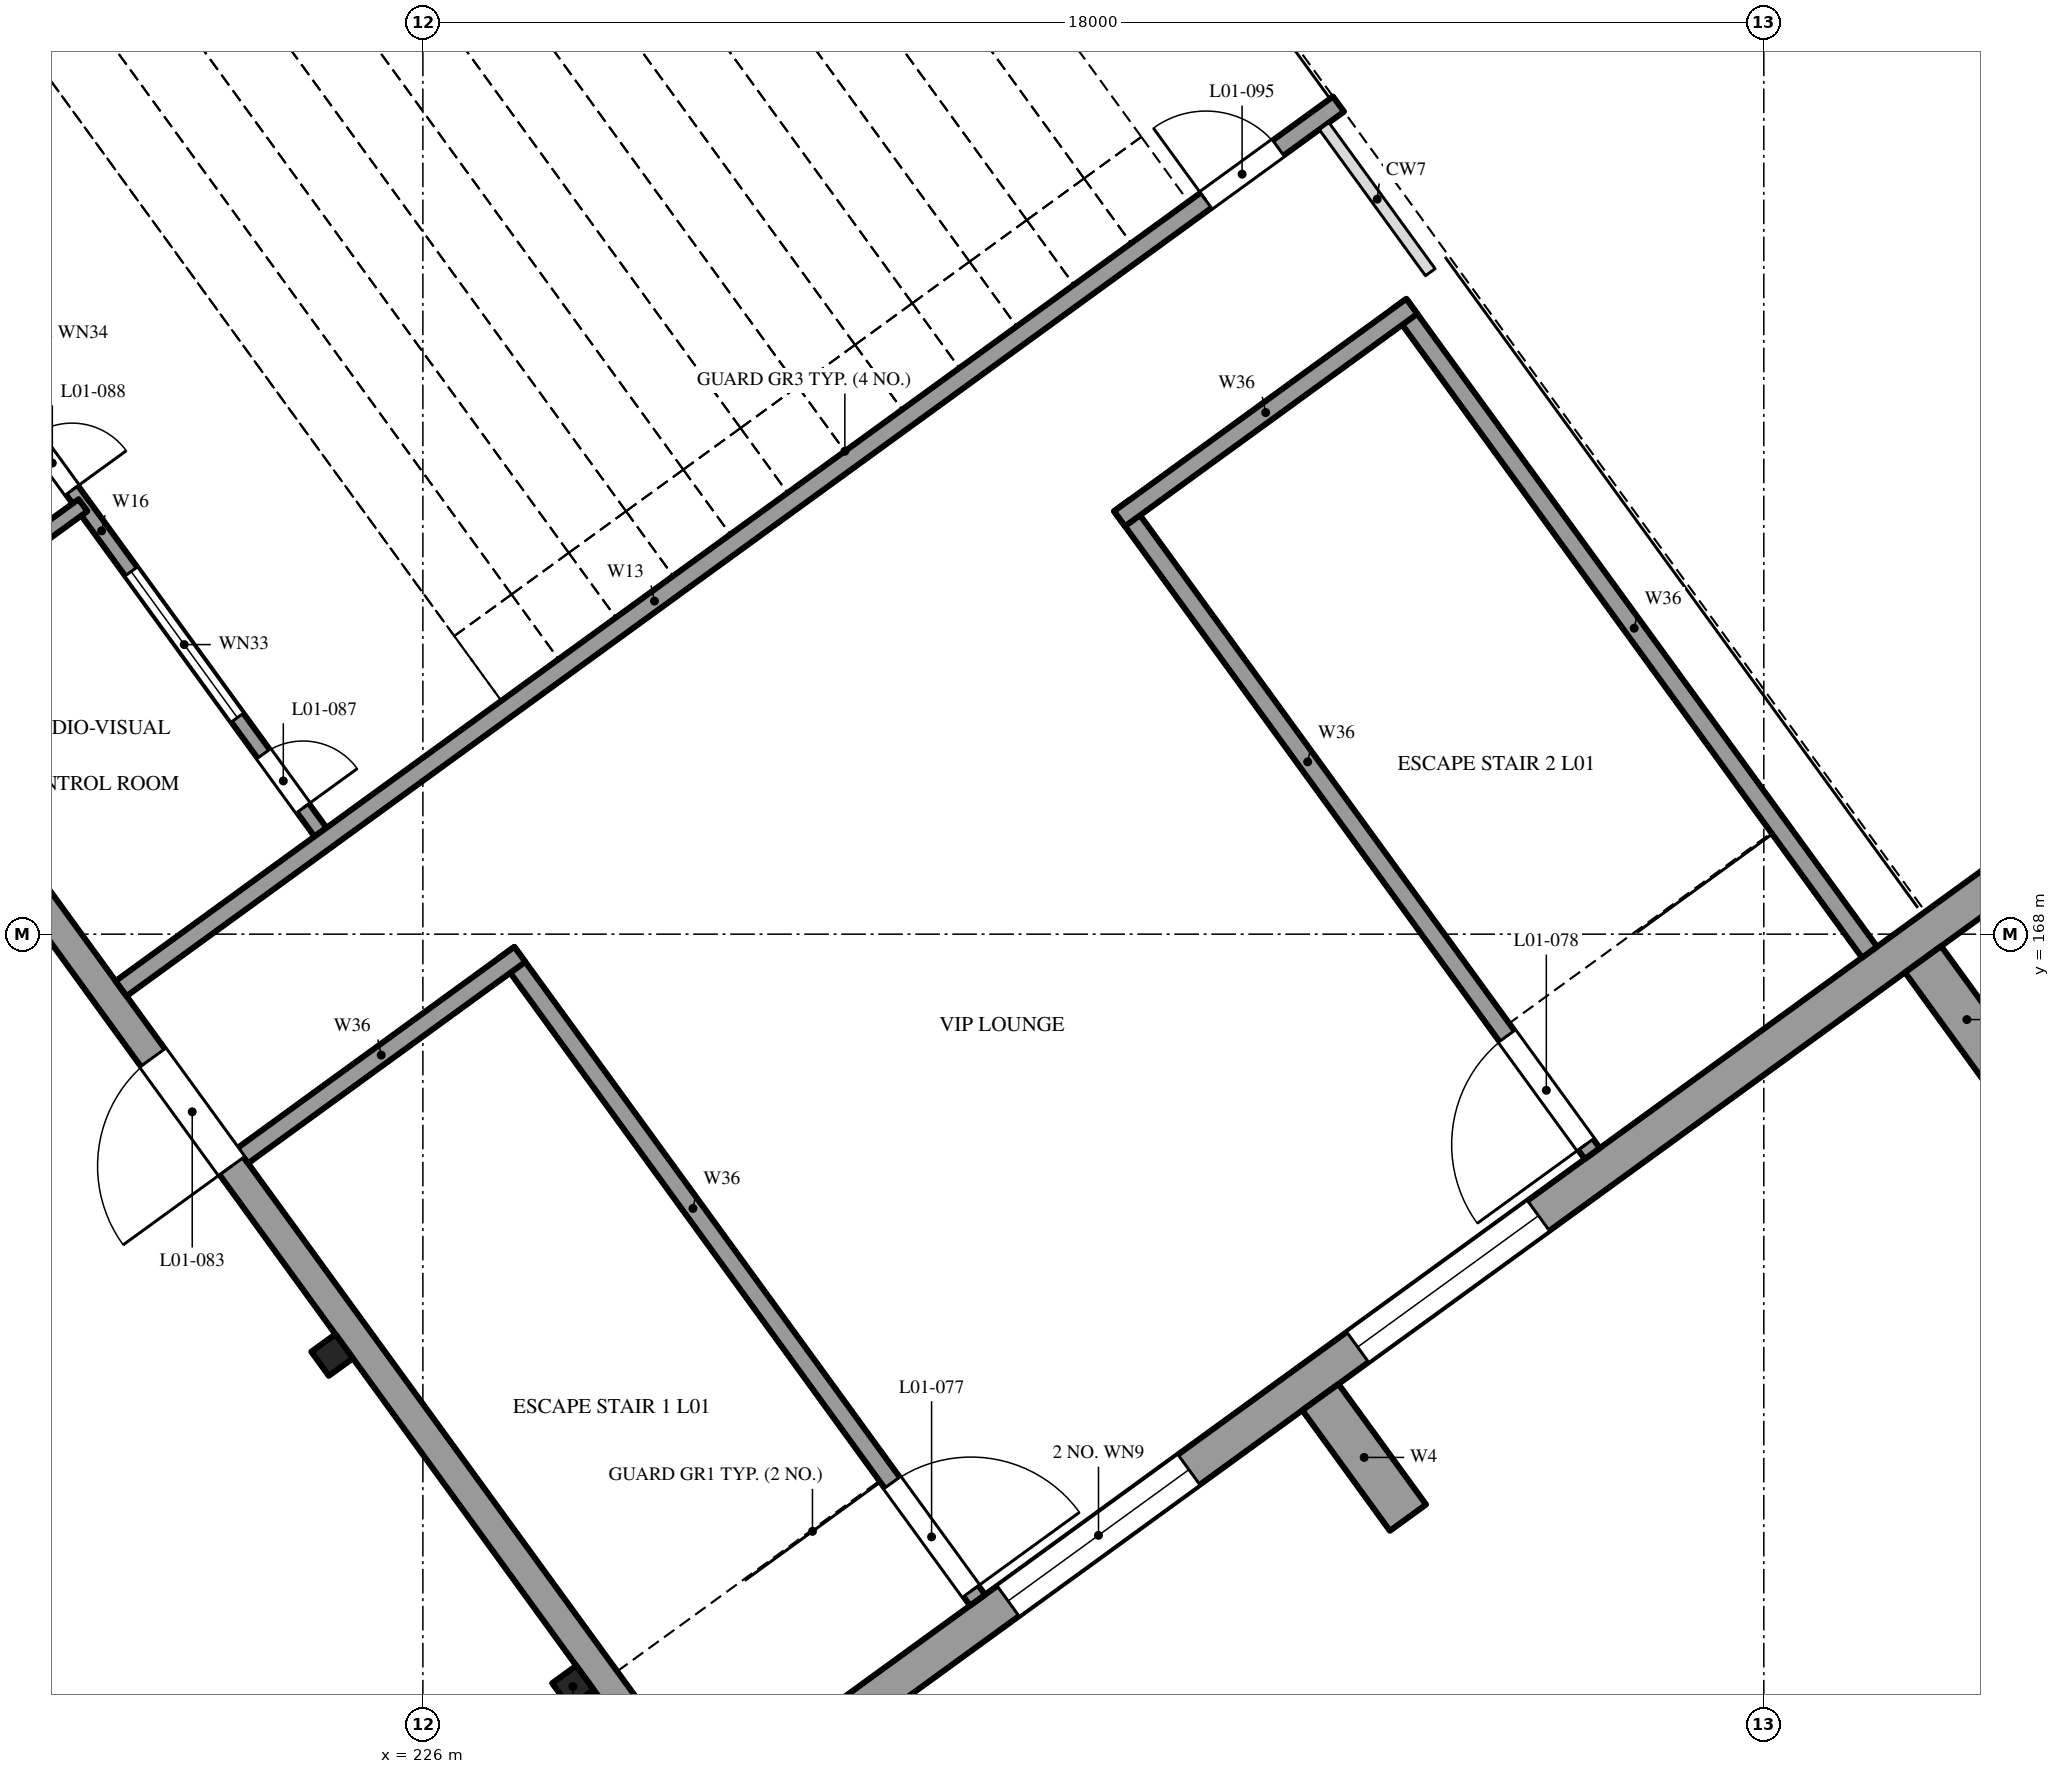
"""IFC4 building model, lengths in metres.
Left out: names, types, materials, properties, quantities, classifications, styles, units other than length and angle.
Written with IfcOpenShell. Run it as: python <this file> out.ifc"""

import sys

from ifc_helpers import new_model, si_unit, direction, frame, frame_2d, origin, origin_2d, place, context, subcontext, project, spatial, rectangle, extrude, element, fill, save


model = new_model("IFC4")
c1 = context("Model", 3, precision=1e-05, world=origin(), true_north=direction((0.0, 1.0)))
c2 = subcontext(c1, "Body", "Model", "MODEL_VIEW")
j1 = project(units=[si_unit("LENGTHUNIT", "METRE"), si_unit("PLANEANGLEUNIT", "RADIAN")], contexts=[c1])
p1 = place(None, origin())
s1 = spatial("IfcSite", under=j1, at=p1, CompositionType="ELEMENT")
p2 = place(p1, origin())
s2 = spatial("IfcBuilding", under=s1, at=p2, CompositionType="ELEMENT")
p3 = place(p2, frame((0.0, 0.0, 7.2)))
s3 = spatial("IfcBuildingStorey", under=s2, at=p3, CompositionType="ELEMENT", Elevation=7.2)
p4 = place(p3, frame((229.649, 155.991, 0.0), z_axis=(0.0, 0.0, 1.0), x_axis=(0.809016008294, 0.587786609514, 0.0)))
e1 = element("IfcWall", 1, at=p4, inside=s3, PredefinedType="SOLIDWALL", context=c2, shape_type="SweptSolid", body=[
    extrude(rectangle(XDim=60.4, YDim=0.5, at=frame_2d((30.2, 0.0))), origin(), (0.0, 0.0, 1.0), 4.8),
])
p5 = place(p4, frame((5.2, 0.0, 1.0)))
e2 = element("IfcOpeningElement", 2, at=p5, cuts=e1, PredefinedType="OPENING", context=c2, shape_type="SweptSolid", body=[
    extrude(rectangle(XDim=3.0, YDim=2.0, at=frame_2d((1.5, 1.0))), frame((0.0, 0.26, 0.0), z_axis=(0.0, -1.0, 0.0), x_axis=(1.0, 0.0, 0.0)), (0.0, 0.0, 1.0), 0.52),
])
p6 = place(p4, frame((11.0, 0.0, 1.0)))
e3 = element("IfcOpeningElement", 3, at=p6, cuts=e1, PredefinedType="OPENING", context=c2, shape_type="SweptSolid", body=[
    extrude(rectangle(XDim=3.0, YDim=2.0, at=frame_2d((1.5, 1.0))), frame((0.0, 0.26, 0.0), z_axis=(0.0, -1.0, 0.0), x_axis=(1.0, 0.0, 0.0)), (0.0, 0.0, 1.0), 0.52),
])
p7 = place(p3, frame((229.664, 156.311, 0.0), z_axis=(0.0, 0.0, 1.0), x_axis=(-0.587784977279, 0.809017194184, 0.0)))
e4 = element("IfcWall", 4, at=p7, inside=s3, PredefinedType="SOLIDWALL", context=c2, shape_type="SweptSolid", body=[
    extrude(rectangle(XDim=53.5, YDim=0.4, at=frame_2d((26.75, 0.0))), origin(), (0.0, 0.0, 1.0), 4.8),
])
p8 = place(p7, frame((10.6, 0.0, 0.0)))
e5 = element("IfcOpeningElement", 5, at=p8, cuts=e4, PredefinedType="OPENING", context=c2, shape_type="SweptSolid", body=[
    extrude(rectangle(XDim=1.8, YDim=2.1, at=frame_2d((0.9, 1.05))), frame((0.0, 0.21, 0.0), z_axis=(0.0, -1.0, 0.0), x_axis=(1.0, 0.0, 0.0)), (0.0, 0.0, 1.0), 0.42),
])
for number, where, z_axis, x_axis in (
    (6, (238.048, 161.784, 0.0), (0.0, 0.0, 1.0), (0.588, -0.809, 0.0)),
    (7, (246.138, 167.662, 0.0), (0.0, 0.0, 1.0), (0.588, -0.809, 0.0)),
):
    element("IfcWall", number, at=place(p3, frame(where, z_axis=z_axis, x_axis=x_axis)), inside=s3, PredefinedType="SOLIDWALL", context=c2, shape_type="SweptSolid", body=[
        extrude(rectangle(XDim=2.0, YDim=0.6, at=frame_2d((1.0, 0.0))), origin(), (0.0, 0.0, 1.0), 4.8),
    ])
p9 = place(p3, frame((228.015, 157.9, 0.0), z_axis=(0.0, 0.0, 1.0), x_axis=(0.809016994375, 0.587785252292, 0.0)))
e8 = element("IfcColumn", 8, at=p9, inside=s3, PredefinedType="COLUMN", context=c2, shape_type="SweptSolid", body=[
    extrude(rectangle(XDim=0.4, YDim=0.4, at=origin_2d()), origin(), (0.0, 0.0, 1.0), 6.492),
])
p10 = place(p3, frame((224.782, 162.35, 0.0), z_axis=(0.0, 0.0, 1.0), x_axis=(0.809016994375, 0.587785252292, 0.0)))
e9 = element("IfcColumn", 9, at=p10, inside=s3, PredefinedType="COLUMN", context=c2, shape_type="SweptSolid", body=[
    extrude(rectangle(XDim=0.4, YDim=0.4, at=origin_2d()), origin(), (0.0, 0.0, 1.0), 6.323),
])
p11 = place(p3, frame((233.446, 159.059, 0.0), z_axis=(0.0, 0.0, 1.0), x_axis=(-0.587801633775, 0.809005092278, 0.0)))
e10 = element("IfcWall", 10, at=p11, inside=s3, PredefinedType="SOLIDWALL", context=c2, shape_type="SweptSolid", body=[
    extrude(rectangle(XDim=10.75, YDim=0.25, at=frame_2d((5.375, 0.0))), origin(), (0.0, 0.0, 1.0), 4.55),
])
p12 = place(p11, frame((0.15, 0.0, 0.0)))
e11 = element("IfcOpeningElement", 11, at=p12, cuts=e10, PredefinedType="OPENING", context=c2, shape_type="SweptSolid", body=[
    extrude(rectangle(XDim=1.8, YDim=2.1, at=frame_2d((0.9, 1.05))), frame((0.0, 0.135, 0.0), z_axis=(0.0, -1.0, 0.0), x_axis=(1.0, 0.0, 0.0)), (0.0, 0.0, 1.0), 0.27),
])
p13 = place(p3, frame((223.58, 165.024, 0.0), z_axis=(0.0, 0.0, 1.0), x_axis=(0.809009113768, 0.587796098864, 0.0)))
e12 = element("IfcWall", 12, at=p13, inside=s3, PredefinedType="SOLIDWALL", context=c2, shape_type="SweptSolid", body=[
    extrude(rectangle(XDim=4.6, YDim=0.25, at=frame_2d((2.3, 0.0))), origin(), (0.0, 0.0, 1.0), 4.55),
])
p14 = place(p3, frame((241.698, 165.054, 0.0), z_axis=(0.0, 0.0, 1.0), x_axis=(-0.587790834139, 0.809012938897, 0.0)))
e13 = element("IfcWall", 13, at=p14, inside=s3, PredefinedType="SOLIDWALL", context=c2, shape_type="SweptSolid", body=[
    extrude(rectangle(XDim=10.75, YDim=0.25, at=frame_2d((5.375, 0.0))), origin(), (0.0, 0.0, 1.0), 4.55),
])
p15 = place(p14, frame((0.15, 0.0, 0.0)))
e14 = element("IfcOpeningElement", 14, at=p15, cuts=e13, PredefinedType="OPENING", context=c2, shape_type="SweptSolid", body=[
    extrude(rectangle(XDim=1.8, YDim=2.1, at=frame_2d((0.9, 1.05))), frame((0.0, 0.135, 0.0), z_axis=(0.0, -1.0, 0.0), x_axis=(1.0, 0.0, 0.0)), (0.0, 0.0, 1.0), 0.27),
])
p16 = place(p3, frame((245.419, 167.758, 0.0), z_axis=(0.0, 0.0, 1.0), x_axis=(-0.587801633775, 0.809005092278, 0.0)))
e15 = element("IfcWall", 15, at=p16, inside=s3, PredefinedType="SOLIDWALL", context=c2, shape_type="SweptSolid", body=[
    extrude(rectangle(XDim=10.75, YDim=0.25, at=frame_2d((5.375, 0.0))), origin(), (0.0, 0.0, 1.0), 4.55),
])
p17 = place(p3, frame((235.351, 173.577, 0.0), z_axis=(0.0, 0.0, 1.0), x_axis=(0.809016791155, 0.587785532001, 0.0)))
e16 = element("IfcWall", 16, at=p17, inside=s3, PredefinedType="SOLIDWALL", context=c2, shape_type="SweptSolid", body=[
    extrude(rectangle(XDim=4.85, YDim=0.25, at=frame_2d((2.425, 0.0))), origin(), (0.0, 0.0, 1.0), 4.55),
])
p18 = place(p3, frame((224.626, 169.369, 1.8), z_axis=(0.0, 0.0, 1.0), x_axis=(-0.587785255346, 0.809016992157, 0.0)))
e17 = element("IfcWall", 17, at=p18, inside=s3, PredefinedType="SOLIDWALL", context=c2, shape_type="SweptSolid", body=[
    extrude(rectangle(XDim=26.45, YDim=0.2, at=frame_2d((13.225, 0.0))), origin(), (0.0, 0.0, 1.0), 2.75),
])
p19 = place(p18, frame((0.4, 0.0, 0.0)))
e18 = element("IfcOpeningElement", 18, at=p19, cuts=e17, PredefinedType="OPENING", context=c2, shape_type="SweptSolid", body=[
    extrude(rectangle(XDim=0.9, YDim=2.1, at=frame_2d((0.45, 1.05))), frame((0.0, 0.11, 0.0), z_axis=(0.0, -1.0, 0.0), x_axis=(1.0, 0.0, 0.0)), (0.0, 0.0, 1.0), 0.22),
])
p20 = place(p18, frame((1.9, 0.0, 1.0)))
e19 = element("IfcOpeningElement", 19, at=p20, cuts=e17, PredefinedType="OPENING", context=c2, shape_type="SweptSolid", body=[
    extrude(rectangle(XDim=2.425, YDim=1.0, at=frame_2d((1.212, 0.5))), frame((0.0, 0.11, 0.0), z_axis=(0.0, -1.0, 0.0), x_axis=(1.0, 0.0, 0.0)), (0.0, 0.0, 1.0), 0.22),
])
p21 = place(p18, frame((5.675, 0.0, 0.0)))
e20 = element("IfcOpeningElement", 20, at=p21, cuts=e17, PredefinedType="OPENING", context=c2, shape_type="SweptSolid", body=[
    extrude(rectangle(XDim=0.9, YDim=2.1, at=frame_2d((0.45, 1.05))), frame((0.0, 0.11, 0.0), z_axis=(0.0, -1.0, 0.0), x_axis=(1.0, 0.0, 0.0)), (0.0, 0.0, 1.0), 0.22),
])
p22 = place(p18, frame((6.875, 0.0, 1.0)))
e21 = element("IfcOpeningElement", 21, at=p22, cuts=e17, PredefinedType="OPENING", context=c2, shape_type="SweptSolid", body=[
    extrude(rectangle(XDim=0.9, YDim=1.0, at=frame_2d((0.45, 0.5))), frame((0.0, 0.11, 0.0), z_axis=(0.0, -1.0, 0.0), x_axis=(1.0, 0.0, 0.0)), (0.0, 0.0, 1.0), 0.22),
])
p23 = place(p18, frame((8.275, 0.0, 0.0)))
e22 = element("IfcOpeningElement", 22, at=p23, cuts=e17, PredefinedType="OPENING", context=c2, shape_type="SweptSolid", body=[
    extrude(rectangle(XDim=0.9, YDim=2.1, at=frame_2d((0.45, 1.05))), frame((0.0, 0.11, 0.0), z_axis=(0.0, -1.0, 0.0), x_axis=(1.0, 0.0, 0.0)), (0.0, 0.0, 1.0), 0.22),
])
p24 = place(p18, frame((9.475, 0.0, 1.0)))
e23 = element("IfcOpeningElement", 23, at=p24, cuts=e17, PredefinedType="OPENING", context=c2, shape_type="SweptSolid", body=[
    extrude(rectangle(XDim=0.9, YDim=1.0, at=frame_2d((0.45, 0.5))), frame((0.0, 0.11, 0.0), z_axis=(0.0, -1.0, 0.0), x_axis=(1.0, 0.0, 0.0)), (0.0, 0.0, 1.0), 0.22),
])
p25 = place(p18, frame((10.875, 0.0, 0.0)))
e24 = element("IfcOpeningElement", 24, at=p25, cuts=e17, PredefinedType="OPENING", context=c2, shape_type="SweptSolid", body=[
    extrude(rectangle(XDim=0.9, YDim=2.1, at=frame_2d((0.45, 1.05))), frame((0.0, 0.11, 0.0), z_axis=(0.0, -1.0, 0.0), x_axis=(1.0, 0.0, 0.0)), (0.0, 0.0, 1.0), 0.22),
])
p26 = place(p18, frame((12.075, 0.0, 1.0)))
e25 = element("IfcOpeningElement", 25, at=p26, cuts=e17, PredefinedType="OPENING", context=c2, shape_type="SweptSolid", body=[
    extrude(rectangle(XDim=0.9, YDim=1.0, at=frame_2d((0.45, 0.5))), frame((0.0, 0.11, 0.0), z_axis=(0.0, -1.0, 0.0), x_axis=(1.0, 0.0, 0.0)), (0.0, 0.0, 1.0), 0.22),
])
p27 = place(p18, frame((13.475, 0.0, 0.0)))
e26 = element("IfcOpeningElement", 26, at=p27, cuts=e17, PredefinedType="OPENING", context=c2, shape_type="SweptSolid", body=[
    extrude(rectangle(XDim=0.9, YDim=2.1, at=frame_2d((0.45, 1.05))), frame((0.0, 0.11, 0.0), z_axis=(0.0, -1.0, 0.0), x_axis=(1.0, 0.0, 0.0)), (0.0, 0.0, 1.0), 0.22),
])
p28 = place(p18, frame((14.675, 0.0, 1.0)))
e27 = element("IfcOpeningElement", 27, at=p28, cuts=e17, PredefinedType="OPENING", context=c2, shape_type="SweptSolid", body=[
    extrude(rectangle(XDim=0.9, YDim=1.0, at=frame_2d((0.45, 0.5))), frame((0.0, 0.11, 0.0), z_axis=(0.0, -1.0, 0.0), x_axis=(1.0, 0.0, 0.0)), (0.0, 0.0, 1.0), 0.22),
])
p29 = place(p18, frame((16.075, 0.0, 0.0)))
e28 = element("IfcOpeningElement", 28, at=p29, cuts=e17, PredefinedType="OPENING", context=c2, shape_type="SweptSolid", body=[
    extrude(rectangle(XDim=0.9, YDim=2.1, at=frame_2d((0.45, 1.05))), frame((0.0, 0.11, 0.0), z_axis=(0.0, -1.0, 0.0), x_axis=(1.0, 0.0, 0.0)), (0.0, 0.0, 1.0), 0.22),
])
p30 = place(p18, frame((17.275, 0.0, 1.0)))
e29 = element("IfcOpeningElement", 29, at=p30, cuts=e17, PredefinedType="OPENING", context=c2, shape_type="SweptSolid", body=[
    extrude(rectangle(XDim=0.9, YDim=1.0, at=frame_2d((0.45, 0.5))), frame((0.0, 0.11, 0.0), z_axis=(0.0, -1.0, 0.0), x_axis=(1.0, 0.0, 0.0)), (0.0, 0.0, 1.0), 0.22),
])
p31 = place(p18, frame((18.675, 0.0, 0.0)))
e30 = element("IfcOpeningElement", 30, at=p31, cuts=e17, PredefinedType="OPENING", context=c2, shape_type="SweptSolid", body=[
    extrude(rectangle(XDim=0.9, YDim=2.1, at=frame_2d((0.45, 1.05))), frame((0.0, 0.11, 0.0), z_axis=(0.0, -1.0, 0.0), x_axis=(1.0, 0.0, 0.0)), (0.0, 0.0, 1.0), 0.22),
])
p32 = place(p18, frame((19.875, 0.0, 1.0)))
e31 = element("IfcOpeningElement", 31, at=p32, cuts=e17, PredefinedType="OPENING", context=c2, shape_type="SweptSolid", body=[
    extrude(rectangle(XDim=0.9, YDim=1.0, at=frame_2d((0.45, 0.5))), frame((0.0, 0.11, 0.0), z_axis=(0.0, -1.0, 0.0), x_axis=(1.0, 0.0, 0.0)), (0.0, 0.0, 1.0), 0.22),
])
p33 = place(p18, frame((21.425, 0.0, 0.0)))
e32 = element("IfcOpeningElement", 32, at=p33, cuts=e17, PredefinedType="OPENING", context=c2, shape_type="SweptSolid", body=[
    extrude(rectangle(XDim=0.9, YDim=2.1, at=frame_2d((0.45, 1.05))), frame((0.0, 0.11, 0.0), z_axis=(0.0, -1.0, 0.0), x_axis=(1.0, 0.0, 0.0)), (0.0, 0.0, 1.0), 0.22),
])
p34 = place(p18, frame((22.925, 0.0, 1.0)))
e33 = element("IfcOpeningElement", 33, at=p34, cuts=e17, PredefinedType="OPENING", context=c2, shape_type="SweptSolid", body=[
    extrude(rectangle(XDim=2.425, YDim=1.0, at=frame_2d((1.212, 0.5))), frame((0.0, 0.11, 0.0), z_axis=(0.0, -1.0, 0.0), x_axis=(1.0, 0.0, 0.0)), (0.0, 0.0, 1.0), 0.22),
])
p35 = place(p3, frame((218.687, 171.76, 1.8), z_axis=(0.0, 0.0, 1.0), x_axis=(0.80901544635, 0.587787382961, 0.0)))
e34 = element("IfcWall", 34, at=p35, inside=s3, PredefinedType="SOLIDWALL", context=c2, shape_type="SweptSolid", body=[
    extrude(rectangle(XDim=3.4, YDim=0.2, at=frame_2d((1.7, 0.0))), origin(), (0.0, 0.0, 1.0), 2.75),
])
p36 = place(p3, frame((221.949, 167.27, 0.0), z_axis=(0.0, 0.0, 1.0), x_axis=(0.809018740047, 0.587782849573, 0.0)))
e35 = element("IfcWall", 35, at=p36, inside=s3, PredefinedType="SOLIDWALL", context=c2, shape_type="SweptSolid", body=[
    extrude(rectangle(XDim=20.2, YDim=0.25, at=frame_2d((10.1, 0.0))), origin(), (0.0, 0.0, 1.0), 4.55),
])
p37 = place(p36, frame((18.0, 0.0, 0.0)))
e36 = element("IfcOpeningElement", 36, at=p37, cuts=e35, PredefinedType="OPENING", context=c2, shape_type="SweptSolid", body=[
    extrude(rectangle(XDim=1.2, YDim=2.1, at=frame_2d((0.6, 1.05))), frame((0.0, 0.135, 0.0), z_axis=(0.0, -1.0, 0.0), x_axis=(1.0, 0.0, 0.0)), (0.0, 0.0, 1.0), 0.27),
])
p38 = place(p5, origin())
e37 = element("IfcWindow", 37, at=p38, inside=s3, PartitioningType="SINGLE_PANEL", PredefinedType="WINDOW", context=c2, shape_type="SweptSolid", body=[
    extrude(rectangle(XDim=3.0, YDim=2.0, at=frame_2d((1.5, 1.0))), frame((0.0, 0.03, 0.0), z_axis=(0.0, -1.0, 0.0), x_axis=(1.0, 0.0, 0.0)), (0.0, 0.0, 1.0), 0.06),
])
fill(e2, e37)
p39 = place(p6, origin())
e38 = element("IfcWindow", 38, at=p39, inside=s3, PartitioningType="SINGLE_PANEL", PredefinedType="WINDOW", context=c2, shape_type="SweptSolid", body=[
    extrude(rectangle(XDim=3.0, YDim=2.0, at=frame_2d((1.5, 1.0))), frame((0.0, 0.03, 0.0), z_axis=(0.0, -1.0, 0.0), x_axis=(1.0, 0.0, 0.0)), (0.0, 0.0, 1.0), 0.06),
])
fill(e3, e38)
p40 = place(p12, frame((1.8, 0.0, 0.0), z_axis=(0.0, 0.0, 1.0), x_axis=(-1.0, 0.0, 0.0)))
e39 = element("IfcDoor", 39, at=p40, inside=s3, OperationType="DOUBLE_DOOR_SINGLE_SWING", PredefinedType="DOOR", context=c2, shape_type="SweptSolid", body=[
    extrude(rectangle(XDim=1.8, YDim=2.1, at=frame_2d((0.9, 1.05))), frame((0.0, 0.025, 0.0), z_axis=(0.0, -1.0, 0.0), x_axis=(1.0, 0.0, 0.0)), (0.0, 0.0, 1.0), 0.05),
])
fill(e11, e39)
p41 = place(p15, origin())
e40 = element("IfcDoor", 40, at=p41, inside=s3, OperationType="DOUBLE_DOOR_SINGLE_SWING", PredefinedType="DOOR", context=c2, shape_type="SweptSolid", body=[
    extrude(rectangle(XDim=1.8, YDim=2.1, at=frame_2d((0.9, 1.05))), frame((0.0, 0.025, 0.0), z_axis=(0.0, -1.0, 0.0), x_axis=(1.0, 0.0, 0.0)), (0.0, 0.0, 1.0), 0.05),
])
fill(e14, e40)
p42 = place(p8, origin())
e41 = element("IfcDoor", 41, at=p42, inside=s3, OperationType="DOUBLE_DOOR_SINGLE_SWING", PredefinedType="DOOR", context=c2, shape_type="SweptSolid", body=[
    extrude(rectangle(XDim=1.8, YDim=2.1, at=frame_2d((0.9, 1.05))), frame((0.0, 0.025, 0.0), z_axis=(0.0, -1.0, 0.0), x_axis=(1.0, 0.0, 0.0)), (0.0, 0.0, 1.0), 0.05),
])
fill(e5, e41)
p43 = place(p19, frame((0.9, 0.0, 0.0), z_axis=(0.0, 0.0, 1.0), x_axis=(-1.0, 0.0, 0.0)))
e42 = element("IfcDoor", 42, at=p43, inside=s3, OperationType="SINGLE_SWING_RIGHT", PredefinedType="DOOR", context=c2, shape_type="SweptSolid", body=[
    extrude(rectangle(XDim=0.9, YDim=2.1, at=frame_2d((0.45, 1.05))), frame((0.0, 0.025, 0.0), z_axis=(0.0, -1.0, 0.0), x_axis=(1.0, 0.0, 0.0)), (0.0, 0.0, 1.0), 0.05),
])
fill(e18, e42)
p44 = place(p20, origin())
e43 = element("IfcWindow", 43, at=p44, inside=s3, PartitioningType="SINGLE_PANEL", PredefinedType="WINDOW", context=c2, shape_type="SweptSolid", body=[
    extrude(rectangle(XDim=2.425, YDim=1.0, at=frame_2d((1.212, 0.5))), frame((0.0, 0.03, 0.0), z_axis=(0.0, -1.0, 0.0), x_axis=(1.0, 0.0, 0.0)), (0.0, 0.0, 1.0), 0.06),
])
fill(e19, e43)
p45 = place(p21, frame((0.9, 0.0, 0.0), z_axis=(0.0, 0.0, 1.0), x_axis=(-1.0, 0.0, 0.0)))
e44 = element("IfcDoor", 44, at=p45, inside=s3, OperationType="SINGLE_SWING_RIGHT", PredefinedType="DOOR", context=c2, shape_type="SweptSolid", body=[
    extrude(rectangle(XDim=0.9, YDim=2.1, at=frame_2d((0.45, 1.05))), frame((0.0, 0.025, 0.0), z_axis=(0.0, -1.0, 0.0), x_axis=(1.0, 0.0, 0.0)), (0.0, 0.0, 1.0), 0.05),
])
fill(e20, e44)
p46 = place(p37, origin())
e45 = element("IfcDoor", 45, at=p46, inside=s3, OperationType="SINGLE_SWING_LEFT", PredefinedType="DOOR", context=c2, shape_type="SweptSolid", body=[
    extrude(rectangle(XDim=1.2, YDim=2.1, at=frame_2d((0.6, 1.05))), frame((0.0, 0.025, 0.0), z_axis=(0.0, -1.0, 0.0), x_axis=(1.0, 0.0, 0.0)), (0.0, 0.0, 1.0), 0.05),
])
fill(e36, e45)
save(model, sys.argv[1])
